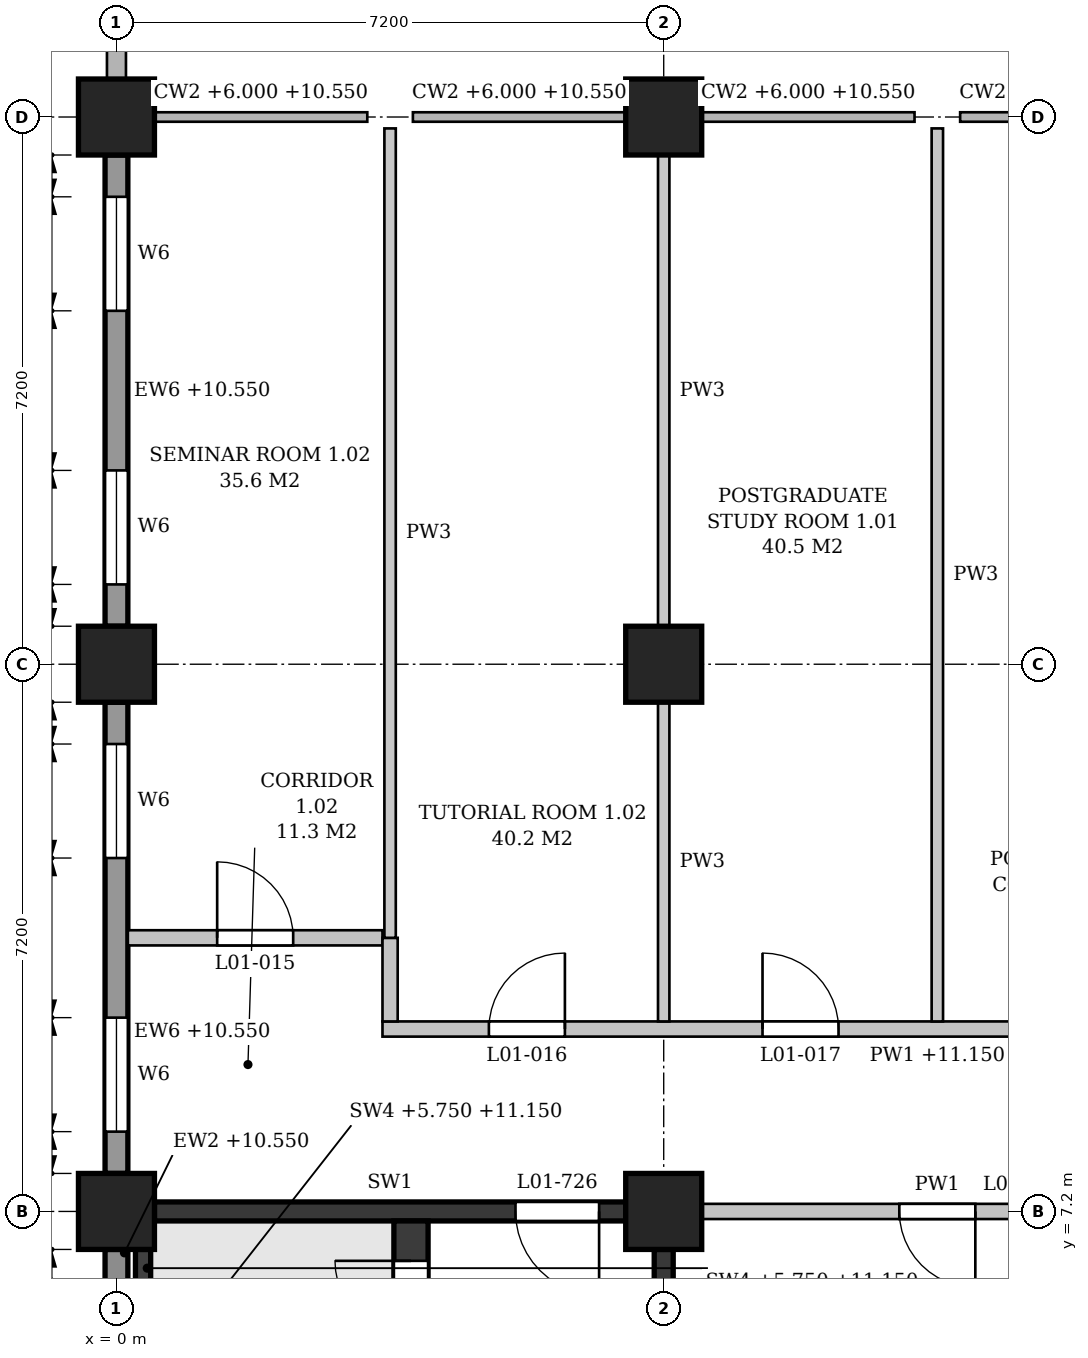
"""IFC4 building model, lengths in metres.
Left out: names, types, materials, properties, quantities, classifications, styles, units other than length and angle.
Written with IfcOpenShell. Run it as: python <this file> out.ifc"""

import sys

from ifc_helpers import new_model, si_unit, direction, frame, frame_2d, origin, origin_2d, place, context, subcontext, project, spatial, polyline, rectangle, outline, extrude, element, fill, save


model = new_model("IFC4")
c1 = context("Model", 3, precision=1e-05, world=origin(), true_north=direction((0.0, 1.0)))
c2 = subcontext(c1, "Body", "Model", "MODEL_VIEW")
j1 = project(units=[si_unit("LENGTHUNIT", "METRE"), si_unit("PLANEANGLEUNIT", "RADIAN")], contexts=[c1])
p1 = place(None, origin())
s1 = spatial("IfcSite", under=j1, at=p1, CompositionType="ELEMENT")
p2 = place(p1, origin())
s2 = spatial("IfcBuilding", under=s1, at=p2, CompositionType="ELEMENT")
p3 = place(p2, frame((0.0, 0.0, 6.0)))
s3 = spatial("IfcBuildingStorey", under=s2, at=p3, CompositionType="ELEMENT", Elevation=6.0)
for number, where, z_axis, x_axis in (
    (1, (0.0, 7.2, 0.0), (0.0, 0.0, 1.0), (1.0, 0.0, 0.0)),
    (2, (0.0, 14.4, 0.0), (0.0, 0.0, 1.0), (1.0, 0.0, 0.0)),
    (3, (0.0, 21.6, 0.0), (0.0, 0.0, 1.0), (1.0, 0.0, 0.0)),
    (4, (7.2, 7.2, 0.0), (0.0, 0.0, 1.0), (1.0, 0.0, 0.0)),
    (5, (7.2, 14.4, 0.0), (0.0, 0.0, 1.0), (1.0, 0.0, 0.0)),
    (6, (7.2, 21.6, 0.0), (0.0, 0.0, 1.0), (1.0, 0.0, 0.0)),
):
    element("IfcColumn", number, at=place(p3, frame(where, z_axis=z_axis, x_axis=x_axis)), inside=s3, PredefinedType="COLUMN", context=c2, shape_type="SweptSolid", body=[
        extrude(rectangle(XDim=1.0, YDim=1.0, at=origin_2d()), origin(), (0.0, 0.0, 1.0), 5.4),
    ])
p4 = place(p3, frame((0.0, 0.5, 0.0), z_axis=(0.0, 0.0, 1.0), x_axis=(0.0, 1.0, 0.0)))
e7 = element("IfcWall", 7, at=p4, inside=s3, PredefinedType="STANDARD", context=c2, shape_type="SweptSolid", body=[
    extrude(rectangle(XDim=6.2, YDim=0.3, at=frame_2d((3.1, 0.0))), origin(), (0.0, 0.0, 1.0), 4.55),
])
p5 = place(p4, frame((0.85, 0.0, 0.9)))
e8 = element("IfcOpeningElement", 8, at=p5, cuts=e7, PredefinedType="OPENING", context=c2, shape_type="SweptSolid", body=[
    extrude(outline(polyline([(0.0, 0.0), (0.9, 0.0), (0.9, 3.15), (0.45, 3.6), (0.0, 3.15), (0.0, 0.0)])), frame((0.0, 0.16, 0.0), z_axis=(0.0, -1.0, 0.0), x_axis=(1.0, 0.0, 0.0)), (0.0, 0.0, 1.0), 0.32),
])
p6 = place(p4, frame((4.45, 0.0, 0.9)))
e9 = element("IfcOpeningElement", 9, at=p6, cuts=e7, PredefinedType="OPENING", context=c2, shape_type="SweptSolid", body=[
    extrude(outline(polyline([(0.0, 0.0), (0.9, 0.0), (0.9, 3.15), (0.45, 3.6), (0.0, 3.15), (0.0, 0.0)])), frame((0.0, 0.16, 0.0), z_axis=(0.0, -1.0, 0.0), x_axis=(1.0, 0.0, 0.0)), (0.0, 0.0, 1.0), 0.32),
])
p7 = place(p3, frame((0.0, 7.7, 0.0), z_axis=(0.0, 0.0, 1.0), x_axis=(0.0, 1.0, 0.0)))
e10 = element("IfcWall", 10, at=p7, inside=s3, PredefinedType="STANDARD", context=c2, shape_type="SweptSolid", body=[
    extrude(rectangle(XDim=6.2, YDim=0.3, at=frame_2d((3.1, 0.0))), origin(), (0.0, 0.0, 1.0), 4.55),
])
p8 = place(p7, frame((0.55, 0.0, 0.9)))
e11 = element("IfcOpeningElement", 11, at=p8, cuts=e10, PredefinedType="OPENING", context=c2, shape_type="SweptSolid", body=[
    extrude(outline(polyline([(0.0, 0.0), (1.5, 0.0), (1.5, 2.85), (0.75, 3.6), (0.0, 2.85), (0.0, 0.0)])), frame((0.0, 0.16, 0.0), z_axis=(0.0, -1.0, 0.0), x_axis=(1.0, 0.0, 0.0)), (0.0, 0.0, 1.0), 0.32),
])
p9 = place(p7, frame((4.15, 0.0, 0.9)))
e12 = element("IfcOpeningElement", 12, at=p9, cuts=e10, PredefinedType="OPENING", context=c2, shape_type="SweptSolid", body=[
    extrude(outline(polyline([(0.0, 0.0), (1.5, 0.0), (1.5, 2.85), (0.75, 3.6), (0.0, 2.85), (0.0, 0.0)])), frame((0.0, 0.16, 0.0), z_axis=(0.0, -1.0, 0.0), x_axis=(1.0, 0.0, 0.0)), (0.0, 0.0, 1.0), 0.32),
])
p10 = place(p3, frame((0.0, 14.9, 0.0), z_axis=(0.0, 0.0, 1.0), x_axis=(0.0, 1.0, 0.0)))
e13 = element("IfcWall", 13, at=p10, inside=s3, PredefinedType="STANDARD", context=c2, shape_type="SweptSolid", body=[
    extrude(rectangle(XDim=6.2, YDim=0.3, at=frame_2d((3.1, 0.0))), origin(), (0.0, 0.0, 1.0), 4.55),
])
p11 = place(p10, frame((0.55, 0.0, 0.9)))
e14 = element("IfcOpeningElement", 14, at=p11, cuts=e13, PredefinedType="OPENING", context=c2, shape_type="SweptSolid", body=[
    extrude(outline(polyline([(0.0, 0.0), (1.5, 0.0), (1.5, 2.85), (0.75, 3.6), (0.0, 2.85), (0.0, 0.0)])), frame((0.0, 0.16, 0.0), z_axis=(0.0, -1.0, 0.0), x_axis=(1.0, 0.0, 0.0)), (0.0, 0.0, 1.0), 0.32),
])
p12 = place(p10, frame((4.15, 0.0, 0.9)))
e15 = element("IfcOpeningElement", 15, at=p12, cuts=e13, PredefinedType="OPENING", context=c2, shape_type="SweptSolid", body=[
    extrude(outline(polyline([(0.0, 0.0), (1.5, 0.0), (1.5, 2.85), (0.75, 3.6), (0.0, 2.85), (0.0, 0.0)])), frame((0.0, 0.16, 0.0), z_axis=(0.0, -1.0, 0.0), x_axis=(1.0, 0.0, 0.0)), (0.0, 0.0, 1.0), 0.32),
])
p13 = place(p3, frame((0.5, 7.2, 0.0), z_axis=(0.0, 0.0, 1.0), x_axis=(1.0, 0.0, 0.0)))
e16 = element("IfcWall", 16, at=p13, inside=s3, PredefinedType="SHEAR", context=c2, shape_type="SweptSolid", body=[
    extrude(rectangle(XDim=6.2, YDim=0.25, at=frame_2d((3.1, 0.0))), origin(), (0.0, 0.0, 1.0), 4.4),
])
p14 = place(p13, frame((4.75, 0.0, 0.0)))
e17 = element("IfcOpeningElement", 17, at=p14, cuts=e16, PredefinedType="OPENING", context=c2, shape_type="SweptSolid", body=[
    extrude(rectangle(XDim=1.1, YDim=2.1, at=frame_2d((0.55, 1.05))), frame((0.0, 0.135, 0.0), z_axis=(0.0, -1.0, 0.0), x_axis=(1.0, 0.0, 0.0)), (0.0, 0.0, 1.0), 0.27),
])
p15 = place(p3, frame((7.2, 0.5, 0.0), z_axis=(0.0, 0.0, 1.0), x_axis=(0.0, 1.0, 0.0)))
e18 = element("IfcWall", 18, at=p15, inside=s3, PredefinedType="SHEAR", context=c2, shape_type="SweptSolid", body=[
    extrude(rectangle(XDim=6.2, YDim=0.25, at=frame_2d((3.1, 0.0))), origin(), (0.0, 0.0, 1.0), 4.4),
])
p16 = place(p3, frame((0.35, 5.85, -0.25), z_axis=(0.0, 0.0, 1.0), x_axis=(0.0, 1.0, 0.0)))
e19 = element("IfcWall", 19, at=p16, inside=s3, PredefinedType="SHEAR", context=c2, shape_type="SweptSolid", body=[
    extrude(rectangle(XDim=0.85, YDim=0.2, at=frame_2d((0.425, 0.0))), origin(), (0.0, 0.0, 1.0), 5.4),
])
p17 = place(p3, frame((3.875, 0.15, 0.0), z_axis=(0.0, 0.0, 1.0), x_axis=(0.0, 1.0, 0.0)))
e20 = element("IfcWall", 20, at=p17, inside=s3, PredefinedType="SHEAR", context=c2, shape_type="SweptSolid", body=[
    extrude(rectangle(XDim=6.925, YDim=0.45, at=frame_2d((3.462, 0.0))), origin(), (0.0, 0.0, 1.0), 5.15),
])
p18 = place(p17, frame((5.4, 0.0, 0.0)))
e21 = element("IfcOpeningElement", 21, at=p18, cuts=e20, PredefinedType="OPENING", context=c2, shape_type="SweptSolid", body=[
    extrude(rectangle(XDim=1.0, YDim=2.1, at=frame_2d((0.5, 1.05))), frame((0.0, 0.235, 0.0), z_axis=(0.0, -1.0, 0.0), x_axis=(1.0, 0.0, 0.0)), (0.0, 0.0, 1.0), 0.47),
])
p19 = place(p3, frame((7.7, 7.2, 0.0), z_axis=(0.0, 0.0, 1.0), x_axis=(1.0, 0.0, 0.0)))
e22 = element("IfcWall", 22, at=p19, inside=s3, PredefinedType="PARTITIONING", context=c2, shape_type="SweptSolid", body=[
    extrude(rectangle(XDim=6.2, YDim=0.2, at=frame_2d((3.1, 0.0))), origin(), (0.0, 0.0, 1.0), 4.4),
])
p20 = place(p19, frame((2.6, 0.0, 0.0)))
e23 = element("IfcOpeningElement", 23, at=p20, cuts=e22, PredefinedType="OPENING", context=c2, shape_type="SweptSolid", body=[
    extrude(rectangle(XDim=1.0, YDim=2.1, at=frame_2d((0.5, 1.05))), frame((0.0, 0.11, 0.0), z_axis=(0.0, -1.0, 0.0), x_axis=(1.0, 0.0, 0.0)), (0.0, 0.0, 1.0), 0.22),
])
p21 = place(p3, frame((3.5, 9.6, 0.0), z_axis=(0.0, 0.0, 1.0), x_axis=(1.0, 0.0, 0.0)))
e24 = element("IfcWall", 24, at=p21, inside=s3, PredefinedType="PARTITIONING", context=c2, shape_type="SweptSolid", body=[
    extrude(outline(polyline([(0.0, 0.0), (14.6, 0.0), (14.6, 5.15), (11.15, 5.15), (11.15, 4.4), (10.65, 4.4), (10.65, 5.15), (3.95, 5.15), (3.95, 4.4), (3.45, 4.4), (3.45, 5.15), (0.0, 5.15), (0.0, 0.0)])), frame((0.0, 0.1, 0.0), z_axis=(0.0, -1.0, 0.0), x_axis=(1.0, 0.0, 0.0)), (0.0, 0.0, 1.0), 0.2),
])
p22 = place(p21, frame((1.4, 0.0, 0.0)))
e25 = element("IfcOpeningElement", 25, at=p22, cuts=e24, PredefinedType="OPENING", context=c2, shape_type="SweptSolid", body=[
    extrude(rectangle(XDim=1.0, YDim=2.1, at=frame_2d((0.5, 1.05))), frame((0.0, 0.11, 0.0), z_axis=(0.0, -1.0, 0.0), x_axis=(1.0, 0.0, 0.0)), (0.0, 0.0, 1.0), 0.22),
])
p23 = place(p21, frame((5.0, 0.0, 0.0)))
e26 = element("IfcOpeningElement", 26, at=p23, cuts=e24, PredefinedType="OPENING", context=c2, shape_type="SweptSolid", body=[
    extrude(rectangle(XDim=1.0, YDim=2.1, at=frame_2d((0.5, 1.05))), frame((0.0, 0.11, 0.0), z_axis=(0.0, -1.0, 0.0), x_axis=(1.0, 0.0, 0.0)), (0.0, 0.0, 1.0), 0.22),
])
p24 = place(p3, frame((0.15, 10.8, 0.0), z_axis=(0.0, 0.0, 1.0), x_axis=(1.0, 0.0, 0.0)))
e27 = element("IfcWall", 27, at=p24, inside=s3, PredefinedType="PARTITIONING", context=c2, shape_type="SweptSolid", body=[
    extrude(outline(polyline([(0.0, 0.0), (3.35, 0.0), (3.35, 5.15), (0.1, 5.15), (0.1, 4.55), (0.0, 4.55), (0.0, 0.0)])), frame((0.0, 0.1, 0.0), z_axis=(0.0, -1.0, 0.0), x_axis=(1.0, 0.0, 0.0)), (0.0, 0.0, 1.0), 0.2),
])
p25 = place(p24, frame((1.175, 0.0, 0.0)))
e28 = element("IfcOpeningElement", 28, at=p25, cuts=e27, PredefinedType="OPENING", context=c2, shape_type="SweptSolid", body=[
    extrude(rectangle(XDim=1.0, YDim=2.1, at=frame_2d((0.5, 1.05))), frame((0.0, 0.11, 0.0), z_axis=(0.0, -1.0, 0.0), x_axis=(1.0, 0.0, 0.0)), (0.0, 0.0, 1.0), 0.22),
])
p26 = place(p3, frame((3.6, 9.7, 0.0), z_axis=(0.0, 0.0, 1.0), x_axis=(0.0, 1.0, 0.0)))
e29 = element("IfcWall", 29, at=p26, inside=s3, PredefinedType="PARTITIONING", context=c2, shape_type="SweptSolid", body=[
    extrude(rectangle(XDim=1.1, YDim=0.2, at=frame_2d((0.55, 0.0))), origin(), (0.0, 0.0, 1.0), 5.15),
])
p27 = place(p3, frame((3.6, 10.8, 0.0), z_axis=(0.0, 0.0, 1.0), x_axis=(0.0, 1.0, 0.0)))
e30 = element("IfcWall", 30, at=p27, inside=s3, PredefinedType="PARTITIONING", context=c2, shape_type="SweptSolid", body=[
    extrude(rectangle(XDim=10.65, YDim=0.15, at=frame_2d((5.325, 0.0))), origin(), (0.0, 0.0, 1.0), 4.4),
])
p28 = place(p3, frame((7.2, 9.7, 0.0), z_axis=(0.0, 0.0, 1.0), x_axis=(0.0, 1.0, 0.0)))
e31 = element("IfcWall", 31, at=p28, inside=s3, PredefinedType="PARTITIONING", context=c2, shape_type="SweptSolid", body=[
    extrude(rectangle(XDim=4.2, YDim=0.15, at=frame_2d((2.1, 0.0))), origin(), (0.0, 0.0, 1.0), 4.4),
])
p29 = place(p3, frame((7.2, 14.9, 0.0), z_axis=(0.0, 0.0, 1.0), x_axis=(0.0, 1.0, 0.0)))
e32 = element("IfcWall", 32, at=p29, inside=s3, PredefinedType="PARTITIONING", context=c2, shape_type="SweptSolid", body=[
    extrude(rectangle(XDim=6.2, YDim=0.15, at=frame_2d((3.1, 0.0))), origin(), (0.0, 0.0, 1.0), 4.4),
])
p30 = place(p3, frame((10.8, 9.7, 0.0), z_axis=(0.0, 0.0, 1.0), x_axis=(0.0, 1.0, 0.0)))
e33 = element("IfcWall", 33, at=p30, inside=s3, PredefinedType="PARTITIONING", context=c2, shape_type="SweptSolid", body=[
    extrude(rectangle(XDim=11.75, YDim=0.15, at=frame_2d((5.875, 0.0))), origin(), (0.0, 0.0, 1.0), 4.4),
])
p31 = place(p8, origin())
e34 = element("IfcWindow", 34, at=p31, inside=s3, PartitioningType="SINGLE_PANEL", PredefinedType="WINDOW", context=c2, shape_type="SweptSolid", body=[
    extrude(outline(polyline([(0.0, 0.0), (1.5, 0.0), (1.5, 2.85), (0.75, 3.6), (0.0, 2.85), (0.0, 0.0)])), frame((0.0, 0.03, 0.0), z_axis=(0.0, -1.0, 0.0), x_axis=(1.0, 0.0, 0.0)), (0.0, 0.0, 1.0), 0.06),
])
fill(e11, e34)
p32 = place(p9, origin())
e35 = element("IfcWindow", 35, at=p32, inside=s3, PartitioningType="SINGLE_PANEL", PredefinedType="WINDOW", context=c2, shape_type="SweptSolid", body=[
    extrude(outline(polyline([(0.0, 0.0), (1.5, 0.0), (1.5, 2.85), (0.75, 3.6), (0.0, 2.85), (0.0, 0.0)])), frame((0.0, 0.03, 0.0), z_axis=(0.0, -1.0, 0.0), x_axis=(1.0, 0.0, 0.0)), (0.0, 0.0, 1.0), 0.06),
])
fill(e12, e35)
p33 = place(p11, origin())
e36 = element("IfcWindow", 36, at=p33, inside=s3, PartitioningType="SINGLE_PANEL", PredefinedType="WINDOW", context=c2, shape_type="SweptSolid", body=[
    extrude(outline(polyline([(0.0, 0.0), (1.5, 0.0), (1.5, 2.85), (0.75, 3.6), (0.0, 2.85), (0.0, 0.0)])), frame((0.0, 0.03, 0.0), z_axis=(0.0, -1.0, 0.0), x_axis=(1.0, 0.0, 0.0)), (0.0, 0.0, 1.0), 0.06),
])
fill(e14, e36)
p34 = place(p12, origin())
e37 = element("IfcWindow", 37, at=p34, inside=s3, PartitioningType="SINGLE_PANEL", PredefinedType="WINDOW", context=c2, shape_type="SweptSolid", body=[
    extrude(outline(polyline([(0.0, 0.0), (1.5, 0.0), (1.5, 2.85), (0.75, 3.6), (0.0, 2.85), (0.0, 0.0)])), frame((0.0, 0.03, 0.0), z_axis=(0.0, -1.0, 0.0), x_axis=(1.0, 0.0, 0.0)), (0.0, 0.0, 1.0), 0.06),
])
fill(e15, e37)
p35 = place(p18, origin())
e38 = element("IfcDoor", 38, at=p35, inside=s3, OperationType="SINGLE_SWING_RIGHT", PredefinedType="DOOR", context=c2, shape_type="SweptSolid", body=[
    extrude(rectangle(XDim=1.0, YDim=2.1, at=frame_2d((0.5, 1.05))), frame((0.0, 0.025, 0.0), z_axis=(0.0, -1.0, 0.0), x_axis=(1.0, 0.0, 0.0)), (0.0, 0.0, 1.0), 0.05),
])
fill(e21, e38)
p36 = place(p14, frame((1.1, 0.0, 0.0), z_axis=(0.0, 0.0, 1.0), x_axis=(-1.0, 0.0, 0.0)))
e39 = element("IfcDoor", 39, at=p36, inside=s3, OperationType="SINGLE_SWING_LEFT", PredefinedType="DOOR", context=c2, shape_type="SweptSolid", body=[
    extrude(rectangle(XDim=1.1, YDim=2.1, at=frame_2d((0.55, 1.05))), frame((0.0, 0.025, 0.0), z_axis=(0.0, -1.0, 0.0), x_axis=(1.0, 0.0, 0.0)), (0.0, 0.0, 1.0), 0.05),
])
fill(e17, e39)
p37 = place(p20, frame((1.0, 0.0, 0.0), z_axis=(0.0, 0.0, 1.0), x_axis=(-1.0, 0.0, 0.0)))
e40 = element("IfcDoor", 40, at=p37, inside=s3, OperationType="SINGLE_SWING_LEFT", PredefinedType="DOOR", context=c2, shape_type="SweptSolid", body=[
    extrude(rectangle(XDim=1.0, YDim=2.1, at=frame_2d((0.5, 1.05))), frame((0.0, 0.025, 0.0), z_axis=(0.0, -1.0, 0.0), x_axis=(1.0, 0.0, 0.0)), (0.0, 0.0, 1.0), 0.05),
])
fill(e23, e40)
p38 = place(p25, origin())
e41 = element("IfcDoor", 41, at=p38, inside=s3, OperationType="SINGLE_SWING_LEFT", PredefinedType="DOOR", context=c2, shape_type="SweptSolid", body=[
    extrude(rectangle(XDim=1.0, YDim=2.1, at=frame_2d((0.5, 1.05))), frame((0.0, 0.025, 0.0), z_axis=(0.0, -1.0, 0.0), x_axis=(1.0, 0.0, 0.0)), (0.0, 0.0, 1.0), 0.05),
])
fill(e28, e41)
p39 = place(p22, origin())
e42 = element("IfcDoor", 42, at=p39, inside=s3, OperationType="SINGLE_SWING_RIGHT", PredefinedType="DOOR", context=c2, shape_type="SweptSolid", body=[
    extrude(rectangle(XDim=1.0, YDim=2.1, at=frame_2d((0.5, 1.05))), frame((0.0, 0.025, 0.0), z_axis=(0.0, -1.0, 0.0), x_axis=(1.0, 0.0, 0.0)), (0.0, 0.0, 1.0), 0.05),
])
fill(e25, e42)
p40 = place(p23, origin())
e43 = element("IfcDoor", 43, at=p40, inside=s3, OperationType="SINGLE_SWING_LEFT", PredefinedType="DOOR", context=c2, shape_type="SweptSolid", body=[
    extrude(rectangle(XDim=1.0, YDim=2.1, at=frame_2d((0.5, 1.05))), frame((0.0, 0.025, 0.0), z_axis=(0.0, -1.0, 0.0), x_axis=(1.0, 0.0, 0.0)), (0.0, 0.0, 1.0), 0.05),
])
fill(e26, e43)
save(model, sys.argv[1])
